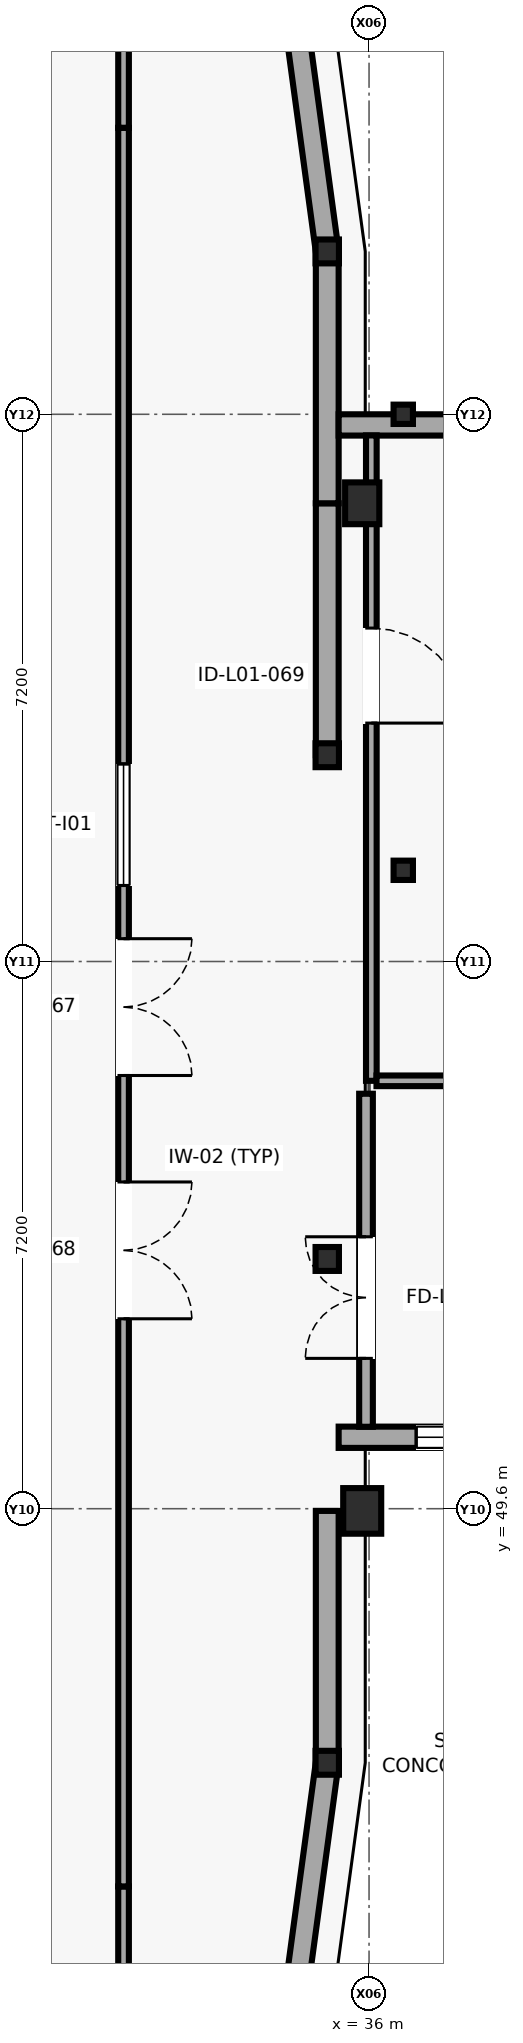
"""IFC4 building model, lengths in metres.
Left out: names, types, materials, properties, quantities, classifications, styles, units other than length and angle.
Written with IfcOpenShell. Run it as: python <this file> out.ifc"""

import sys

from ifc_helpers import new_model, si_unit, direction, frame, frame_2d, origin, origin_2d, place, context, subcontext, project, spatial, rectangle, i_section, extrude, element, fill, save


model = new_model("IFC4")
c1 = context("Model", 3, precision=1e-05, world=origin(), true_north=direction((0.0, 1.0)))
c2 = subcontext(c1, "Body", "Model", "MODEL_VIEW")
j1 = project(units=[si_unit("LENGTHUNIT", "METRE"), si_unit("PLANEANGLEUNIT", "RADIAN")], contexts=[c1])
p1 = place(None, origin())
s1 = spatial("IfcSite", under=j1, at=p1, CompositionType="ELEMENT")
p2 = place(p1, origin())
s2 = spatial("IfcBuilding", under=s1, at=p2, CompositionType="ELEMENT")
p3 = place(p2, frame((0.0, 0.0, 4.2)))
s3 = spatial("IfcBuildingStorey", under=s2, at=p3, CompositionType="ELEMENT", Elevation=4.2)
for number, where, z_axis, x_axis in (
    (1, (35.45, 46.257, 0.0), (0.0, 0.0, 1.0), (1.0, 0.0, 0.0)),
    (2, (35.45, 52.886, 0.0), (0.0, 0.0, 1.0), (1.0, 0.0, 0.0)),
    (3, (35.45, 59.514, 0.0), (0.0, 0.0, 1.0), (1.0, 0.0, 0.0)),
    (4, (35.45, 66.143, 0.0), (0.0, 0.0, 1.0), (1.0, 0.0, 0.0)),
):
    element("IfcColumn", number, at=place(p3, frame(where, z_axis=z_axis, x_axis=x_axis)), inside=s3, PredefinedType="COLUMN", context=c2, shape_type="SweptSolid", body=[
        extrude(i_section(OverallWidth=0.307, OverallDepth=0.314, WebThickness=0.012, FlangeThickness=0.019, FilletRadius=0.015, at=origin_2d()), origin(), (0.0, 0.0, 1.0), 4.0),
    ])
p4 = place(p3, frame((35.91, 49.571, 0.0), z_axis=(0.0, 0.0, 1.0), x_axis=(1.0, 0.0, 0.0)))
e5 = element("IfcColumn", 5, at=p4, inside=s3, PredefinedType="PILASTER", context=c2, shape_type="SweptSolid", body=[
    extrude(rectangle(XDim=0.5, YDim=0.6, at=origin_2d()), origin(), (0.0, 0.0, 1.0), 4.0),
])
p5 = place(p3, frame((35.91, 62.829, 0.0), z_axis=(0.0, 0.0, 1.0), x_axis=(1.0, 0.0, 0.0)))
e6 = element("IfcColumn", 6, at=p5, inside=s3, PredefinedType="PILASTER", context=c2, shape_type="SweptSolid", body=[
    extrude(rectangle(XDim=0.45, YDim=0.55, at=origin_2d()), origin(), (0.0, 0.0, 1.0), 4.0),
])
for number, where, z_axis, x_axis in (
    (7, (36.45, 58.0, 0.0), (0.0, 0.0, 1.0), (1.0, 0.0, 0.0)),
    (8, (36.45, 64.0, 0.0), (0.0, 0.0, 1.0), (1.0, 0.0, 0.0)),
):
    element("IfcColumn", number, at=place(p3, frame(where, z_axis=z_axis, x_axis=x_axis)), inside=s3, PredefinedType="COLUMN", context=c2, shape_type="SweptSolid", body=[
        extrude(i_section(OverallWidth=0.255, OverallDepth=0.254, WebThickness=0.009, FlangeThickness=0.014, FilletRadius=0.013, at=origin_2d()), origin(), (0.0, 0.0, 1.0), 4.0),
    ])
p6 = place(p3, frame((35.0, 42.943, 0.0), z_axis=(0.0, 0.0, 1.0), x_axis=(0.134539839792, 0.990908185206, 0.0)))
e9 = element("IfcWall", 9, at=p6, inside=s3, PredefinedType="SOLIDWALL", context=c2, shape_type="SweptSolid", body=[
    extrude(rectangle(XDim=3.344, YDim=0.3, at=frame_2d((1.672, 0.0))), origin(), (0.0, 0.0, 1.0), 3.745),
])
p7 = place(p3, frame((35.45, 46.257, 0.0), z_axis=(0.0, 0.0, 1.0), x_axis=(0.0, 1.0, 0.0)))
e10 = element("IfcWall", 10, at=p7, inside=s3, PredefinedType="SOLIDWALL", context=c2, shape_type="SweptSolid", body=[
    extrude(rectangle(XDim=3.314, YDim=0.3, at=frame_2d((1.657, 0.0))), origin(), (0.0, 0.0, 1.0), 3.48),
])
p8 = place(p3, frame((35.45, 59.514, 0.0), z_axis=(0.0, 0.0, 1.0), x_axis=(0.0, 1.0, 0.0)))
e11 = element("IfcWall", 11, at=p8, inside=s3, PredefinedType="SOLIDWALL", context=c2, shape_type="SweptSolid", body=[
    extrude(rectangle(XDim=3.315, YDim=0.3, at=frame_2d((1.658, 0.0))), origin(), (0.0, 0.0, 1.0), 3.48),
])
p9 = place(p3, frame((35.45, 62.829, 0.0), z_axis=(0.0, 0.0, 1.0), x_axis=(0.0, 1.0, 0.0)))
e12 = element("IfcWall", 12, at=p9, inside=s3, PredefinedType="SOLIDWALL", context=c2, shape_type="SweptSolid", body=[
    extrude(rectangle(XDim=3.314, YDim=0.3, at=frame_2d((1.657, 0.0))), origin(), (0.0, 0.0, 1.0), 3.48),
])
p10 = place(p3, frame((35.45, 66.143, 0.0), z_axis=(0.0, 0.0, 1.0), x_axis=(-0.134539839792, 0.990908185206, 0.0)))
e13 = element("IfcWall", 13, at=p10, inside=s3, PredefinedType="SOLIDWALL", context=c2, shape_type="SweptSolid", body=[
    extrude(rectangle(XDim=3.344, YDim=0.3, at=frame_2d((1.672, 0.0))), origin(), (0.0, 0.0, 1.0), 3.735),
])
p11 = place(p3, frame((43.48, 63.86, 0.0), z_axis=(0.0, 0.0, 1.0), x_axis=(-1.0, 0.0, 0.0)))
e14 = element("IfcWall", 14, at=p11, inside=s3, PredefinedType="SOLIDWALL", context=c2, shape_type="SweptSolid", body=[
    extrude(rectangle(XDim=7.88, YDim=0.28, at=frame_2d((3.94, 0.0))), origin(), (0.0, 0.0, 1.0), 2.86),
])
p12 = place(p11, frame((1.245, 0.0, 0.85)))
e15 = element("IfcOpeningElement", 15, at=p12, cuts=e14, PredefinedType="OPENING", context=c2, shape_type="SweptSolid", body=[
    extrude(rectangle(XDim=1.45, YDim=1.7, at=frame_2d((0.725, 0.85))), frame((0.0, 0.15, 0.0), z_axis=(0.0, -1.0, 0.0), x_axis=(1.0, 0.0, 0.0)), (0.0, 0.0, 1.0), 0.3),
])
p13 = place(p11, frame((4.61, 0.0, 0.85)))
e16 = element("IfcOpeningElement", 16, at=p13, cuts=e14, PredefinedType="OPENING", context=c2, shape_type="SweptSolid", body=[
    extrude(rectangle(XDim=1.7, YDim=1.75, at=frame_2d((0.85, 0.875))), frame((0.0, 0.15, 0.0), z_axis=(0.0, -1.0, 0.0), x_axis=(1.0, 0.0, 0.0)), (0.0, 0.0, 1.0), 0.3),
])
p14 = place(p3, frame((35.6, 50.54, 0.0), z_axis=(0.0, 0.0, 1.0), x_axis=(1.0, 0.0, 0.0)))
e17 = element("IfcWall", 17, at=p14, inside=s3, PredefinedType="SOLIDWALL", context=c2, shape_type="SweptSolid", body=[
    extrude(rectangle(XDim=7.88, YDim=0.28, at=frame_2d((3.94, 0.0))), origin(), (0.0, 0.0, 1.0), 3.78),
])
p15 = place(p14, frame((1.02, 0.0, 0.85)))
e18 = element("IfcOpeningElement", 18, at=p15, cuts=e17, PredefinedType="OPENING", context=c2, shape_type="SweptSolid", body=[
    extrude(rectangle(XDim=1.9, YDim=1.65, at=frame_2d((0.95, 0.825))), frame((0.0, 0.15, 0.0), z_axis=(0.0, -1.0, 0.0), x_axis=(1.0, 0.0, 0.0)), (0.0, 0.0, 1.0), 0.3),
])
p16 = place(p14, frame((4.885, 0.0, 1.05)))
e19 = element("IfcOpeningElement", 19, at=p16, cuts=e17, PredefinedType="OPENING", context=c2, shape_type="SweptSolid", body=[
    extrude(rectangle(XDim=2.05, YDim=1.55, at=frame_2d((1.025, 0.775))), frame((0.0, 0.15, 0.0), z_axis=(0.0, -1.0, 0.0), x_axis=(1.0, 0.0, 0.0)), (0.0, 0.0, 1.0), 0.3),
])
p17 = place(p3, frame((35.96, 50.678, 0.0), z_axis=(0.0, 0.0, 1.0), x_axis=(0.0, 1.0, 0.0)))
e20 = element("IfcWall", 20, at=p17, inside=s3, PredefinedType="PARTITIONING", context=c2, shape_type="SweptSolid", body=[
    extrude(rectangle(XDim=4.382, YDim=0.18, at=frame_2d((2.191, 0.0))), origin(), (0.0, 0.0, 1.0), 3.78),
])
p18 = place(p17, frame((0.9, 0.0, 0.0)))
e21 = element("IfcOpeningElement", 21, at=p18, cuts=e20, PredefinedType="OPENING", context=c2, shape_type="SweptSolid", body=[
    extrude(rectangle(XDim=1.6, YDim=2.25, at=frame_2d((0.8, 1.125))), frame((0.0, 0.1, 0.0), z_axis=(0.0, -1.0, 0.0), x_axis=(1.0, 0.0, 0.0)), (0.0, 0.0, 1.0), 0.2),
])
p19 = place(p3, frame((32.77, 35.966, 0.0), z_axis=(0.0, 0.0, 1.0), x_axis=(0.0, 1.0, 0.0)))
e22 = element("IfcWall", 22, at=p19, inside=s3, PredefinedType="PARTITIONING", context=c2, shape_type="SweptSolid", body=[
    extrude(rectangle(XDim=8.664, YDim=0.14, at=frame_2d((4.332, 0.0))), origin(), (0.0, 0.0, 1.0), 3.78),
])
p20 = place(p3, frame((32.77, 44.63, 0.0), z_axis=(0.0, 0.0, 1.0), x_axis=(0.0, 1.0, 0.0)))
e23 = element("IfcWall", 23, at=p20, inside=s3, PredefinedType="PARTITIONING", context=c2, shape_type="SweptSolid", body=[
    extrude(rectangle(XDim=23.14, YDim=0.14, at=frame_2d((11.57, 0.0))), origin(), (0.0, 0.0, 1.0), 3.78),
])
p21 = place(p20, frame((10.67, 0.0, 0.0)))
e24 = element("IfcOpeningElement", 24, at=p21, cuts=e23, PredefinedType="OPENING", context=c2, shape_type="SweptSolid", body=[
    extrude(rectangle(XDim=1.8, YDim=2.45, at=frame_2d((0.9, 1.225))), frame((0.0, 0.08, 0.0), z_axis=(0.0, -1.0, 0.0), x_axis=(1.0, 0.0, 0.0)), (0.0, 0.0, 1.0), 0.16),
])
p22 = place(p20, frame((7.469, 0.0, 0.0)))
e25 = element("IfcOpeningElement", 25, at=p22, cuts=e23, PredefinedType="OPENING", context=c2, shape_type="SweptSolid", body=[
    extrude(rectangle(XDim=1.8, YDim=2.45, at=frame_2d((0.9, 1.225))), frame((0.0, 0.08, 0.0), z_axis=(0.0, -1.0, 0.0), x_axis=(1.0, 0.0, 0.0)), (0.0, 0.0, 1.0), 0.16),
])
p23 = place(p20, frame((13.17, 0.0, 1.05)))
e26 = element("IfcOpeningElement", 26, at=p23, cuts=e23, PredefinedType="OPENING", context=c2, shape_type="SweptSolid", body=[
    extrude(rectangle(XDim=1.6, YDim=1.1, at=frame_2d((0.8, 0.55))), frame((0.0, 0.08, 0.0), z_axis=(0.0, -1.0, 0.0), x_axis=(1.0, 0.0, 0.0)), (0.0, 0.0, 1.0), 0.16),
])
p24 = place(p3, frame((32.77, 67.77, 0.0), z_axis=(0.0, 0.0, 1.0), x_axis=(0.0, 1.0, 0.0)))
e27 = element("IfcWall", 27, at=p24, inside=s3, PredefinedType="PARTITIONING", context=c2, shape_type="SweptSolid", body=[
    extrude(rectangle(XDim=8.664, YDim=0.14, at=frame_2d((4.332, 0.0))), origin(), (0.0, 0.0, 1.0), 3.78),
])
p25 = place(p3, frame((36.03, 63.722, 0.0), z_axis=(0.0, 0.0, 1.0), x_axis=(0.0, -1.0, 0.0)))
e28 = element("IfcWall", 28, at=p25, inside=s3, PredefinedType="PARTITIONING", context=c2, shape_type="SweptSolid", body=[
    extrude(rectangle(XDim=8.492, YDim=0.14, at=frame_2d((4.246, 0.0))), origin(), (0.0, 0.0, 1.0), 3.76),
])
p26 = place(p25, frame((2.535, 0.0, 0.0)))
e29 = element("IfcOpeningElement", 29, at=p26, cuts=e28, PredefinedType="OPENING", context=c2, shape_type="SweptSolid", body=[
    extrude(rectangle(XDim=1.25, YDim=2.22, at=frame_2d((0.625, 1.11))), frame((0.0, 0.08, 0.0), z_axis=(0.0, -1.0, 0.0), x_axis=(1.0, 0.0, 0.0)), (0.0, 0.0, 1.0), 0.16),
])
p27 = place(p3, frame((36.098, 55.23, 0.0), z_axis=(0.0, 0.0, 1.0), x_axis=(1.0, 0.0, 0.0)))
e30 = element("IfcWall", 30, at=p27, inside=s3, PredefinedType="PARTITIONING", context=c2, shape_type="SweptSolid", body=[
    extrude(rectangle(XDim=7.072, YDim=0.14, at=frame_2d((3.536, 0.0))), origin(), (0.0, 0.0, 1.0), 3.76),
])
p28 = place(p15, origin())
e31 = element("IfcWindow", 31, at=p28, inside=s3, PartitioningType="SINGLE_PANEL", PredefinedType="WINDOW", context=c2, shape_type="SweptSolid", body=[
    extrude(rectangle(XDim=1.9, YDim=1.65, at=frame_2d((0.95, 0.825))), frame((0.0, 0.03, 0.0), z_axis=(0.0, -1.0, 0.0), x_axis=(1.0, 0.0, 0.0)), (0.0, 0.0, 1.0), 0.06),
])
fill(e18, e31)
p29 = place(p18, origin())
e32 = element("IfcDoor", 32, at=p29, inside=s3, OperationType="DOUBLE_DOOR_SINGLE_SWING", PredefinedType="DOOR", context=c2, shape_type="SweptSolid", body=[
    extrude(rectangle(XDim=1.6, YDim=2.25, at=frame_2d((0.8, 1.125))), frame((0.0, 0.025, 0.0), z_axis=(0.0, -1.0, 0.0), x_axis=(1.0, 0.0, 0.0)), (0.0, 0.0, 1.0), 0.05),
])
fill(e21, e32)
p30 = place(p21, frame((1.8, 0.0, 0.0), z_axis=(0.0, 0.0, 1.0), x_axis=(-1.0, 0.0, 0.0)))
e33 = element("IfcDoor", 33, at=p30, inside=s3, OperationType="DOUBLE_DOOR_SINGLE_SWING", PredefinedType="DOOR", context=c2, shape_type="SweptSolid", body=[
    extrude(rectangle(XDim=1.8, YDim=2.45, at=frame_2d((0.9, 1.225))), frame((0.0, 0.025, 0.0), z_axis=(0.0, -1.0, 0.0), x_axis=(1.0, 0.0, 0.0)), (0.0, 0.0, 1.0), 0.05),
])
fill(e24, e33)
p31 = place(p22, frame((1.8, 0.0, 0.0), z_axis=(0.0, 0.0, 1.0), x_axis=(-1.0, 0.0, 0.0)))
e34 = element("IfcDoor", 34, at=p31, inside=s3, OperationType="DOUBLE_DOOR_SINGLE_SWING", PredefinedType="DOOR", context=c2, shape_type="SweptSolid", body=[
    extrude(rectangle(XDim=1.8, YDim=2.45, at=frame_2d((0.9, 1.225))), frame((0.0, 0.025, 0.0), z_axis=(0.0, -1.0, 0.0), x_axis=(1.0, 0.0, 0.0)), (0.0, 0.0, 1.0), 0.05),
])
fill(e25, e34)
p32 = place(p23, origin())
e35 = element("IfcWindow", 35, at=p32, inside=s3, PartitioningType="SINGLE_PANEL", PredefinedType="WINDOW", context=c2, shape_type="SweptSolid", body=[
    extrude(rectangle(XDim=1.6, YDim=1.1, at=frame_2d((0.8, 0.55))), frame((0.0, 0.03, 0.0), z_axis=(0.0, -1.0, 0.0), x_axis=(1.0, 0.0, 0.0)), (0.0, 0.0, 1.0), 0.06),
])
fill(e26, e35)
p33 = place(p26, origin())
e36 = element("IfcDoor", 36, at=p33, inside=s3, OperationType="SINGLE_SWING_RIGHT", PredefinedType="DOOR", context=c2, shape_type="SweptSolid", body=[
    extrude(rectangle(XDim=1.25, YDim=2.22, at=frame_2d((0.625, 1.11))), frame((0.0, 0.025, 0.0), z_axis=(0.0, -1.0, 0.0), x_axis=(1.0, 0.0, 0.0)), (0.0, 0.0, 1.0), 0.05),
])
fill(e29, e36)
save(model, sys.argv[1])
